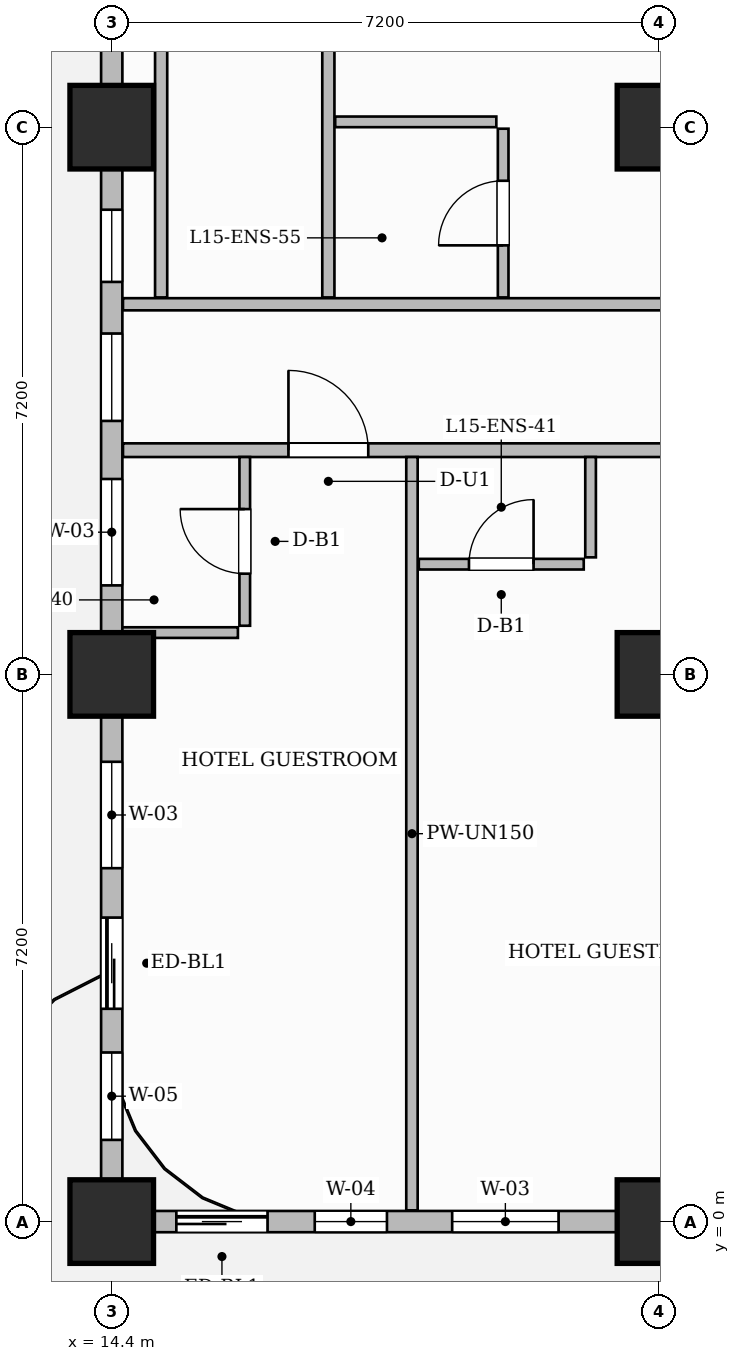
"""IFC4 building model, lengths in metres.
Left out: names, types, materials, properties, quantities, classifications, styles, units other than length and angle.
Written with IfcOpenShell. Run it as: python <this file> out.ifc"""

import sys

from ifc_helpers import new_model, si_unit, direction, frame, frame_2d, origin, origin_2d, place, context, subcontext, project, spatial, rectangle, extrude, source, transform, mapped, element, fill, save


model = new_model("IFC4")
c1 = context("Model", 3, precision=1e-05, world=origin(), true_north=direction((0.0, 1.0)))
c2 = subcontext(c1, "Body", "Model", "MODEL_VIEW")
j1 = project(units=[si_unit("LENGTHUNIT", "METRE"), si_unit("PLANEANGLEUNIT", "RADIAN")], contexts=[c1])
p1 = place(None, origin())
s1 = spatial("IfcSite", under=j1, at=p1, CompositionType="ELEMENT")
p2 = place(p1, origin())
s2 = spatial("IfcBuilding", under=s1, at=p2, CompositionType="ELEMENT")
p3 = place(p2, frame((0.0, 0.0, 65.7)))
s3 = spatial("IfcBuildingStorey", under=s2, at=p3, CompositionType="ELEMENT", Elevation=65.7)
m1 = source(origin(), c2, "Body", "SweptSolid", [
    extrude(rectangle(XDim=1.1, YDim=1.1, at=origin_2d()), origin(), (0.0, 0.0, 1.0), 3.7),
])
for number, where, z_axis, x_axis in (
    (1, (14.4, 0.0, 0.0), (0.0, 0.0, 1.0), (1.0, 0.0, 0.0)),
    (2, (14.4, 7.2, 0.0), (0.0, 0.0, 1.0), (1.0, 0.0, 0.0)),
    (3, (14.4, 14.4, 0.0), (0.0, 0.0, 1.0), (1.0, 0.0, 0.0)),
    (4, (21.6, 0.0, 0.0), (0.0, 0.0, 1.0), (1.0, 0.0, 0.0)),
    (5, (21.6, 7.2, 0.0), (0.0, 0.0, 1.0), (1.0, 0.0, 0.0)),
    (6, (21.6, 14.4, 0.0), (0.0, 0.0, 1.0), (1.0, 0.0, 0.0)),
):
    element("IfcColumn", number, at=place(p3, frame(where, z_axis=z_axis, x_axis=x_axis)), inside=s3, PredefinedType="COLUMN", context=c2, shape_type="MappedRepresentation", body=[
        mapped(m1, transform((0.0, 0.0, 0.0), scale=1.0)),
    ])
p4 = place(p3, frame((14.548, 10.15, 0.0), z_axis=(0.0, 0.0, 1.0), x_axis=(1.0, 0.0, 0.0)))
e7 = element("IfcWall", 7, at=p4, inside=s3, PredefinedType="PARTITIONING", context=c2, shape_type="SweptSolid", body=[
    extrude(rectangle(XDim=15.562, YDim=0.18, at=frame_2d((7.781, 0.0))), origin(), (0.0, 0.0, 1.0), 3.45),
])
p5 = place(p4, frame((2.177, 0.0, 0.0)))
e8 = element("IfcOpeningElement", 8, at=p5, cuts=e7, PredefinedType="OPENING", context=c2, shape_type="SweptSolid", body=[
    extrude(rectangle(XDim=1.05, YDim=2.25, at=frame_2d((0.525, 1.125))), frame((0.0, 0.1, 0.0), z_axis=(0.0, -1.0, 0.0), x_axis=(1.0, 0.0, 0.0)), (0.0, 0.0, 1.0), 0.2),
])
p6 = place(p4, frame((7.162, 0.0, 0.0)))
e9 = element("IfcOpeningElement", 9, at=p6, cuts=e7, PredefinedType="OPENING", context=c2, shape_type="SweptSolid", body=[
    extrude(rectangle(XDim=1.0, YDim=2.2, at=frame_2d((0.5, 1.1))), frame((0.0, 0.1, 0.0), z_axis=(0.0, -1.0, 0.0), x_axis=(1.0, 0.0, 0.0)), (0.0, 0.0, 1.0), 0.2),
])
p7 = place(p4, frame((11.007, 0.0, 0.0)))
e10 = element("IfcOpeningElement", 10, at=p7, cuts=e7, PredefinedType="OPENING", context=c2, shape_type="SweptSolid", body=[
    extrude(rectangle(XDim=1.05, YDim=2.25, at=frame_2d((0.525, 1.125))), frame((0.0, 0.1, 0.0), z_axis=(0.0, -1.0, 0.0), x_axis=(1.0, 0.0, 0.0)), (0.0, 0.0, 1.0), 0.2),
])
p8 = place(p4, frame((14.422, 0.0, 0.0)))
e11 = element("IfcOpeningElement", 11, at=p8, cuts=e7, PredefinedType="OPENING", context=c2, shape_type="SweptSolid", body=[
    extrude(rectangle(XDim=1.0, YDim=2.2, at=frame_2d((0.5, 1.1))), frame((0.0, 0.1, 0.0), z_axis=(0.0, -1.0, 0.0), x_axis=(1.0, 0.0, 0.0)), (0.0, 0.0, 1.0), 0.2),
])
p9 = place(p3, frame((14.548, 12.07, 0.0), z_axis=(0.0, 0.0, 1.0), x_axis=(1.0, 0.0, 0.0)))
e12 = element("IfcWall", 12, at=p9, inside=s3, PredefinedType="PARTITIONING", context=c2, shape_type="SweptSolid", body=[
    extrude(rectangle(XDim=15.562, YDim=0.16, at=frame_2d((7.781, 0.0))), origin(), (0.0, 0.0, 1.0), 3.45),
])
p10 = place(p9, frame((9.827, 0.0, 0.0)))
e13 = element("IfcOpeningElement", 13, at=p10, cuts=e12, PredefinedType="OPENING", context=c2, shape_type="SweptSolid", body=[
    extrude(rectangle(XDim=1.0, YDim=2.2, at=frame_2d((0.5, 1.1))), frame((0.0, 0.09, 0.0), z_axis=(0.0, -1.0, 0.0), x_axis=(1.0, 0.0, 0.0)), (0.0, 0.0, 1.0), 0.18),
])
p11 = place(p3, frame((16.15, 7.84, 0.0), z_axis=(0.0, 0.0, 1.0), x_axis=(0.0, 1.0, 0.0)))
e14 = element("IfcWall", 14, at=p11, inside=s3, PredefinedType="PARTITIONING", context=c2, shape_type="SweptSolid", body=[
    extrude(rectangle(XDim=2.22, YDim=0.14, at=frame_2d((1.11, 0.0))), origin(), (0.0, 0.0, 1.0), 3.45),
])
p12 = place(p11, frame((0.685, 0.0, 0.0)))
e15 = element("IfcOpeningElement", 15, at=p12, cuts=e14, PredefinedType="OPENING", context=c2, shape_type="SweptSolid", body=[
    extrude(rectangle(XDim=0.85, YDim=2.1, at=frame_2d((0.425, 1.05))), frame((0.0, 0.08, 0.0), z_axis=(0.0, -1.0, 0.0), x_axis=(1.0, 0.0, 0.0)), (0.0, 0.0, 1.0), 0.16),
])
p13 = place(p3, frame((14.49, 7.75, 0.0), z_axis=(0.0, 0.0, 1.0), x_axis=(1.0, 0.0, 0.0)))
e16 = element("IfcWall", 16, at=p13, inside=s3, PredefinedType="PARTITIONING", context=c2, shape_type="SweptSolid", body=[
    extrude(rectangle(XDim=1.57, YDim=0.14, at=frame_2d((0.785, 0.0))), origin(), (0.0, 0.0, 1.0), 3.45),
])
p14 = place(p3, frame((18.35, 0.148, 0.0), z_axis=(0.0, 0.0, 1.0), x_axis=(0.0, 1.0, 0.0)))
e17 = element("IfcWall", 17, at=p14, inside=s3, PredefinedType="PARTITIONING", context=c2, shape_type="SweptSolid", body=[
    extrude(rectangle(XDim=9.912, YDim=0.15, at=frame_2d((4.956, 0.0))), origin(), (0.0, 0.0, 1.0), 3.45),
])
p15 = place(p3, frame((20.7, 8.74, 0.0), z_axis=(0.0, 0.0, 1.0), x_axis=(0.0, 1.0, 0.0)))
e18 = element("IfcWall", 18, at=p15, inside=s3, PredefinedType="PARTITIONING", context=c2, shape_type="SweptSolid", body=[
    extrude(rectangle(XDim=1.32, YDim=0.14, at=frame_2d((0.66, 0.0))), origin(), (0.0, 0.0, 1.0), 3.45),
])
p16 = place(p3, frame((18.44, 8.65, 0.0), z_axis=(0.0, 0.0, 1.0), x_axis=(1.0, 0.0, 0.0)))
e19 = element("IfcWall", 19, at=p16, inside=s3, PredefinedType="PARTITIONING", context=c2, shape_type="SweptSolid", body=[
    extrude(rectangle(XDim=2.17, YDim=0.14, at=frame_2d((1.085, 0.0))), origin(), (0.0, 0.0, 1.0), 3.45),
])
p17 = place(p16, frame((0.66, 0.0, 0.0)))
e20 = element("IfcOpeningElement", 20, at=p17, cuts=e19, PredefinedType="OPENING", context=c2, shape_type="SweptSolid", body=[
    extrude(rectangle(XDim=0.85, YDim=2.1, at=frame_2d((0.425, 1.05))), frame((0.0, 0.08, 0.0), z_axis=(0.0, -1.0, 0.0), x_axis=(1.0, 0.0, 0.0)), (0.0, 0.0, 1.0), 0.16),
])
for number, where, z_axis, x_axis in (
    (21, (15.05, 12.16, 0.0), (0.0, 0.0, 1.0), (0.0, 1.0, 0.0)),
    (22, (17.25, 12.16, 0.0), (0.0, 0.0, 1.0), (0.0, 1.0, 0.0)),
):
    element("IfcWall", number, at=place(p3, frame(where, z_axis=z_axis, x_axis=x_axis)), inside=s3, PredefinedType="PARTITIONING", context=c2, shape_type="SweptSolid", body=[
        extrude(rectangle(XDim=12.95, YDim=0.16, at=frame_2d((6.475, 0.0))), origin(), (0.0, 0.0, 1.0), 3.45),
    ])
p18 = place(p3, frame((19.55, 12.16, 0.0), z_axis=(0.0, 0.0, 1.0), x_axis=(0.0, 1.0, 0.0)))
e23 = element("IfcWall", 23, at=p18, inside=s3, PredefinedType="PARTITIONING", context=c2, shape_type="SweptSolid", body=[
    extrude(rectangle(XDim=2.22, YDim=0.14, at=frame_2d((1.11, 0.0))), origin(), (0.0, 0.0, 1.0), 3.45),
])
p19 = place(p18, frame((0.685, 0.0, 0.0)))
e24 = element("IfcOpeningElement", 24, at=p19, cuts=e23, PredefinedType="OPENING", context=c2, shape_type="SweptSolid", body=[
    extrude(rectangle(XDim=0.85, YDim=2.1, at=frame_2d((0.425, 1.05))), frame((0.0, 0.08, 0.0), z_axis=(0.0, -1.0, 0.0), x_axis=(1.0, 0.0, 0.0)), (0.0, 0.0, 1.0), 0.16),
])
p20 = place(p3, frame((17.34, 14.47, 0.0), z_axis=(0.0, 0.0, 1.0), x_axis=(1.0, 0.0, 0.0)))
e25 = element("IfcWall", 25, at=p20, inside=s3, PredefinedType="PARTITIONING", context=c2, shape_type="SweptSolid", body=[
    extrude(rectangle(XDim=2.12, YDim=0.14, at=frame_2d((1.06, 0.0))), origin(), (0.0, 0.0, 1.0), 2.885),
])
p21 = place(p3, frame((14.4, 0.0, 0.0), z_axis=(0.0, 0.0, 1.0), x_axis=(1.0, 0.0, 0.0)))
e26 = element("IfcWall", 26, at=p21, inside=s3, PredefinedType="SOLIDWALL", context=c2, shape_type="SweptSolid", body=[
    extrude(rectangle(XDim=43.2, YDim=0.28, at=frame_2d((21.6, 0.0))), origin(), (0.0, 0.0, 1.0), 2.885),
])
p22 = place(p21, frame((0.85, 0.0, 0.0)))
e27 = element("IfcOpeningElement", 27, at=p22, cuts=e26, PredefinedType="OPENING", context=c2, shape_type="SweptSolid", body=[
    extrude(rectangle(XDim=1.2, YDim=2.2, at=frame_2d((0.6, 1.1))), frame((0.0, 0.15, 0.0), z_axis=(0.0, -1.0, 0.0), x_axis=(1.0, 0.0, 0.0)), (0.0, 0.0, 1.0), 0.3),
])
p23 = place(p21, frame((2.671, 0.0, 0.8)))
e28 = element("IfcOpeningElement", 28, at=p23, cuts=e26, PredefinedType="OPENING", context=c2, shape_type="SweptSolid", body=[
    extrude(rectangle(XDim=0.95, YDim=1.75, at=frame_2d((0.475, 0.875))), frame((0.0, 0.15, 0.0), z_axis=(0.0, -1.0, 0.0), x_axis=(1.0, 0.0, 0.0)), (0.0, 0.0, 1.0), 0.3),
])
p24 = place(p21, frame((4.479, 0.0, 0.8)))
e29 = element("IfcOpeningElement", 29, at=p24, cuts=e26, PredefinedType="OPENING", context=c2, shape_type="SweptSolid", body=[
    extrude(rectangle(XDim=1.4, YDim=1.85, at=frame_2d((0.7, 0.925))), frame((0.0, 0.15, 0.0), z_axis=(0.0, -1.0, 0.0), x_axis=(1.0, 0.0, 0.0)), (0.0, 0.0, 1.0), 0.3),
])
p25 = place(p21, frame((8.181, 0.0, 0.8)))
e30 = element("IfcOpeningElement", 30, at=p25, cuts=e26, PredefinedType="OPENING", context=c2, shape_type="SweptSolid", body=[
    extrude(rectangle(XDim=0.95, YDim=1.75, at=frame_2d((0.475, 0.875))), frame((0.0, 0.15, 0.0), z_axis=(0.0, -1.0, 0.0), x_axis=(1.0, 0.0, 0.0)), (0.0, 0.0, 1.0), 0.3),
])
p26 = place(p21, frame((9.845, 0.0, 0.8)))
e31 = element("IfcOpeningElement", 31, at=p26, cuts=e26, PredefinedType="OPENING", context=c2, shape_type="SweptSolid", body=[
    extrude(rectangle(XDim=1.8, YDim=1.85, at=frame_2d((0.9, 0.925))), frame((0.0, 0.15, 0.0), z_axis=(0.0, -1.0, 0.0), x_axis=(1.0, 0.0, 0.0)), (0.0, 0.0, 1.0), 0.3),
])
p27 = place(p21, frame((12.414, 0.0, 0.8)))
e32 = element("IfcOpeningElement", 32, at=p27, cuts=e26, PredefinedType="OPENING", context=c2, shape_type="SweptSolid", body=[
    extrude(rectangle(XDim=0.95, YDim=1.75, at=frame_2d((0.475, 0.875))), frame((0.0, 0.15, 0.0), z_axis=(0.0, -1.0, 0.0), x_axis=(1.0, 0.0, 0.0)), (0.0, 0.0, 1.0), 0.3),
])
p28 = place(p21, frame((16.804, 0.0, 0.8)))
e33 = element("IfcOpeningElement", 33, at=p28, cuts=e26, PredefinedType="OPENING", context=c2, shape_type="SweptSolid", body=[
    extrude(rectangle(XDim=1.8, YDim=1.85, at=frame_2d((0.9, 0.925))), frame((0.0, 0.15, 0.0), z_axis=(0.0, -1.0, 0.0), x_axis=(1.0, 0.0, 0.0)), (0.0, 0.0, 1.0), 0.3),
])
p29 = place(p21, frame((22.396, 0.0, 0.8)))
e34 = element("IfcOpeningElement", 34, at=p29, cuts=e26, PredefinedType="OPENING", context=c2, shape_type="SweptSolid", body=[
    extrude(rectangle(XDim=1.8, YDim=1.85, at=frame_2d((0.9, 0.925))), frame((0.0, 0.15, 0.0), z_axis=(0.0, -1.0, 0.0), x_axis=(1.0, 0.0, 0.0)), (0.0, 0.0, 1.0), 0.3),
])
p30 = place(p21, frame((25.629, 0.0, 0.8)))
e35 = element("IfcOpeningElement", 35, at=p30, cuts=e26, PredefinedType="OPENING", context=c2, shape_type="SweptSolid", body=[
    extrude(rectangle(XDim=0.95, YDim=1.75, at=frame_2d((0.475, 0.875))), frame((0.0, 0.15, 0.0), z_axis=(0.0, -1.0, 0.0), x_axis=(1.0, 0.0, 0.0)), (0.0, 0.0, 1.0), 0.3),
])
p31 = place(p21, frame((29.075, 0.0, 0.8)))
e36 = element("IfcOpeningElement", 36, at=p31, cuts=e26, PredefinedType="OPENING", context=c2, shape_type="SweptSolid", body=[
    extrude(rectangle(XDim=1.8, YDim=1.85, at=frame_2d((0.9, 0.925))), frame((0.0, 0.15, 0.0), z_axis=(0.0, -1.0, 0.0), x_axis=(1.0, 0.0, 0.0)), (0.0, 0.0, 1.0), 0.3),
])
p32 = place(p21, frame((32.125, 0.0, 0.8)))
e37 = element("IfcOpeningElement", 37, at=p32, cuts=e26, PredefinedType="OPENING", context=c2, shape_type="SweptSolid", body=[
    extrude(rectangle(XDim=1.8, YDim=1.85, at=frame_2d((0.9, 0.925))), frame((0.0, 0.15, 0.0), z_axis=(0.0, -1.0, 0.0), x_axis=(1.0, 0.0, 0.0)), (0.0, 0.0, 1.0), 0.3),
])
p33 = place(p21, frame((36.946, 0.0, 0.8)))
e38 = element("IfcOpeningElement", 38, at=p33, cuts=e26, PredefinedType="OPENING", context=c2, shape_type="SweptSolid", body=[
    extrude(rectangle(XDim=1.8, YDim=1.85, at=frame_2d((0.9, 0.925))), frame((0.0, 0.15, 0.0), z_axis=(0.0, -1.0, 0.0), x_axis=(1.0, 0.0, 0.0)), (0.0, 0.0, 1.0), 0.3),
])
p34 = place(p21, frame((40.054, 0.0, 0.8)))
e39 = element("IfcOpeningElement", 39, at=p34, cuts=e26, PredefinedType="OPENING", context=c2, shape_type="SweptSolid", body=[
    extrude(rectangle(XDim=1.8, YDim=1.85, at=frame_2d((0.9, 0.925))), frame((0.0, 0.15, 0.0), z_axis=(0.0, -1.0, 0.0), x_axis=(1.0, 0.0, 0.0)), (0.0, 0.0, 1.0), 0.3),
])
p35 = place(p3, frame((14.4, 0.05, 0.0), z_axis=(0.0, 0.0, 1.0), x_axis=(0.0, 1.0, 0.0)))
e40 = element("IfcWall", 40, at=p35, inside=s3, PredefinedType="SOLIDWALL", context=c2, shape_type="SweptSolid", body=[
    extrude(rectangle(XDim=20.6, YDim=0.28, at=frame_2d((10.3, 0.0))), origin(), (0.0, 0.0, 1.0), 2.885),
])
p36 = place(p35, frame((2.75, 0.0, 0.0)))
e41 = element("IfcOpeningElement", 41, at=p36, cuts=e40, PredefinedType="OPENING", context=c2, shape_type="SweptSolid", body=[
    extrude(rectangle(XDim=1.2, YDim=2.2, at=frame_2d((0.6, 1.1))), frame((0.0, 0.15, 0.0), z_axis=(0.0, -1.0, 0.0), x_axis=(1.0, 0.0, 0.0)), (0.0, 0.0, 1.0), 0.3),
])
p37 = place(p35, frame((1.025, 0.0, 0.8)))
e42 = element("IfcOpeningElement", 42, at=p37, cuts=e40, PredefinedType="OPENING", context=c2, shape_type="SweptSolid", body=[
    extrude(rectangle(XDim=1.15, YDim=1.8, at=frame_2d((0.575, 0.9))), frame((0.0, 0.15, 0.0), z_axis=(0.0, -1.0, 0.0), x_axis=(1.0, 0.0, 0.0)), (0.0, 0.0, 1.0), 0.3),
])
p38 = place(p35, frame((4.6, 0.0, 0.8)))
e43 = element("IfcOpeningElement", 43, at=p38, cuts=e40, PredefinedType="OPENING", context=c2, shape_type="SweptSolid", body=[
    extrude(rectangle(XDim=1.4, YDim=1.85, at=frame_2d((0.7, 0.925))), frame((0.0, 0.15, 0.0), z_axis=(0.0, -1.0, 0.0), x_axis=(1.0, 0.0, 0.0)), (0.0, 0.0, 1.0), 0.3),
])
p39 = place(p35, frame((8.321, 0.0, 0.8)))
e44 = element("IfcOpeningElement", 44, at=p39, cuts=e40, PredefinedType="OPENING", context=c2, shape_type="SweptSolid", body=[
    extrude(rectangle(XDim=1.4, YDim=1.85, at=frame_2d((0.7, 0.925))), frame((0.0, 0.15, 0.0), z_axis=(0.0, -1.0, 0.0), x_axis=(1.0, 0.0, 0.0)), (0.0, 0.0, 1.0), 0.3),
])
p40 = place(p35, frame((10.485, 0.0, 0.8)))
e45 = element("IfcOpeningElement", 45, at=p40, cuts=e40, PredefinedType="OPENING", context=c2, shape_type="SweptSolid", body=[
    extrude(rectangle(XDim=1.15, YDim=1.8, at=frame_2d((0.575, 0.9))), frame((0.0, 0.15, 0.0), z_axis=(0.0, -1.0, 0.0), x_axis=(1.0, 0.0, 0.0)), (0.0, 0.0, 1.0), 0.3),
])
p41 = place(p35, frame((12.314, 0.0, 0.8)))
e46 = element("IfcOpeningElement", 46, at=p41, cuts=e40, PredefinedType="OPENING", context=c2, shape_type="SweptSolid", body=[
    extrude(rectangle(XDim=0.95, YDim=1.75, at=frame_2d((0.475, 0.875))), frame((0.0, 0.15, 0.0), z_axis=(0.0, -1.0, 0.0), x_axis=(1.0, 0.0, 0.0)), (0.0, 0.0, 1.0), 0.3),
])
p42 = place(p35, frame((16.79, 0.0, 0.8)))
e47 = element("IfcOpeningElement", 47, at=p42, cuts=e40, PredefinedType="OPENING", context=c2, shape_type="SweptSolid", body=[
    extrude(rectangle(XDim=1.8, YDim=1.85, at=frame_2d((0.9, 0.925))), frame((0.0, 0.15, 0.0), z_axis=(0.0, -1.0, 0.0), x_axis=(1.0, 0.0, 0.0)), (0.0, 0.0, 1.0), 0.3),
])
m2 = source(origin(), c2, "Body", "SweptSolid", [
    extrude(rectangle(XDim=0.85, YDim=2.1, at=frame_2d((0.425, 1.05))), frame((0.0, 0.025, 0.0), z_axis=(0.0, -1.0, 0.0), x_axis=(1.0, 0.0, 0.0)), (0.0, 0.0, 1.0), 0.05),
])
p43 = place(p12, origin())
e48 = element("IfcDoor", 48, at=p43, inside=s3, OperationType="SINGLE_SWING_RIGHT", PredefinedType="DOOR", context=c2, shape_type="MappedRepresentation", body=[
    mapped(m2, transform((0.0, 0.0, 0.0), scale=1.0)),
])
fill(e15, e48)
m3 = source(origin(), c2, "Body", "SweptSolid", [
    extrude(rectangle(XDim=1.05, YDim=2.25, at=frame_2d((0.525, 1.125))), frame((0.0, 0.025, 0.0), z_axis=(0.0, -1.0, 0.0), x_axis=(1.0, 0.0, 0.0)), (0.0, 0.0, 1.0), 0.05),
])
p44 = place(p5, origin())
e49 = element("IfcDoor", 49, at=p44, inside=s3, OperationType="SINGLE_SWING_LEFT", PredefinedType="DOOR", context=c2, shape_type="MappedRepresentation", body=[
    mapped(m3, transform((0.0, 0.0, 0.0), scale=1.0)),
])
fill(e8, e49)
p45 = place(p17, origin())
e50 = element("IfcDoor", 50, at=p45, inside=s3, OperationType="SINGLE_SWING_RIGHT", PredefinedType="DOOR", context=c2, shape_type="MappedRepresentation", body=[
    mapped(m2, transform((0.0, 0.0, 0.0), scale=1.0)),
])
fill(e20, e50)
p46 = place(p19, origin())
e51 = element("IfcDoor", 51, at=p46, inside=s3, OperationType="SINGLE_SWING_LEFT", PredefinedType="DOOR", context=c2, shape_type="MappedRepresentation", body=[
    mapped(m2, transform((0.0, 0.0, 0.0), scale=1.0)),
])
fill(e24, e51)
m4 = source(origin(), c2, "Body", "SweptSolid", [
    extrude(rectangle(XDim=1.2, YDim=2.2, at=frame_2d((0.6, 1.1))), frame((0.0, 0.025, 0.0), z_axis=(0.0, -1.0, 0.0), x_axis=(1.0, 0.0, 0.0)), (0.0, 0.0, 1.0), 0.05),
])
p47 = place(p22, origin())
e52 = element("IfcDoor", 52, at=p47, inside=s3, OperationType="SLIDING_TO_LEFT", PredefinedType="DOOR", context=c2, shape_type="MappedRepresentation", body=[
    mapped(m4, transform((0.0, 0.0, 0.0), scale=1.0)),
])
fill(e27, e52)
p48 = place(p36, origin())
e53 = element("IfcDoor", 53, at=p48, inside=s3, OperationType="SLIDING_TO_LEFT", PredefinedType="DOOR", context=c2, shape_type="MappedRepresentation", body=[
    mapped(m4, transform((0.0, 0.0, 0.0), scale=1.0)),
])
fill(e41, e53)
m5 = source(origin(), c2, "Body", "SweptSolid", [
    extrude(rectangle(XDim=0.95, YDim=1.75, at=frame_2d((0.475, 0.875))), frame((0.0, 0.03, 0.0), z_axis=(0.0, -1.0, 0.0), x_axis=(1.0, 0.0, 0.0)), (0.0, 0.0, 1.0), 0.06),
])
p49 = place(p23, origin())
e54 = element("IfcWindow", 54, at=p49, inside=s3, PartitioningType="SINGLE_PANEL", PredefinedType="WINDOW", context=c2, shape_type="MappedRepresentation", body=[
    mapped(m5, transform((0.0, 0.0, 0.0), scale=1.0)),
])
fill(e28, e54)
m6 = source(origin(), c2, "Body", "SweptSolid", [
    extrude(rectangle(XDim=1.4, YDim=1.85, at=frame_2d((0.7, 0.925))), frame((0.0, 0.03, 0.0), z_axis=(0.0, -1.0, 0.0), x_axis=(1.0, 0.0, 0.0)), (0.0, 0.0, 1.0), 0.06),
])
p50 = place(p24, origin())
e55 = element("IfcWindow", 55, at=p50, inside=s3, PartitioningType="SINGLE_PANEL", PredefinedType="WINDOW", context=c2, shape_type="MappedRepresentation", body=[
    mapped(m6, transform((0.0, 0.0, 0.0), scale=1.0)),
])
fill(e29, e55)
m7 = source(origin(), c2, "Body", "SweptSolid", [
    extrude(rectangle(XDim=1.15, YDim=1.8, at=frame_2d((0.575, 0.9))), frame((0.0, 0.03, 0.0), z_axis=(0.0, -1.0, 0.0), x_axis=(1.0, 0.0, 0.0)), (0.0, 0.0, 1.0), 0.06),
])
p51 = place(p37, origin())
e56 = element("IfcWindow", 56, at=p51, inside=s3, PartitioningType="SINGLE_PANEL", PredefinedType="WINDOW", context=c2, shape_type="MappedRepresentation", body=[
    mapped(m7, transform((0.0, 0.0, 0.0), scale=1.0)),
])
fill(e42, e56)
p52 = place(p38, origin())
e57 = element("IfcWindow", 57, at=p52, inside=s3, PartitioningType="SINGLE_PANEL", PredefinedType="WINDOW", context=c2, shape_type="MappedRepresentation", body=[
    mapped(m6, transform((0.0, 0.0, 0.0), scale=1.0)),
])
fill(e43, e57)
p53 = place(p39, origin())
e58 = element("IfcWindow", 58, at=p53, inside=s3, PartitioningType="SINGLE_PANEL", PredefinedType="WINDOW", context=c2, shape_type="MappedRepresentation", body=[
    mapped(m6, transform((0.0, 0.0, 0.0), scale=1.0)),
])
fill(e44, e58)
p54 = place(p40, origin())
e59 = element("IfcWindow", 59, at=p54, inside=s3, PartitioningType="SINGLE_PANEL", PredefinedType="WINDOW", context=c2, shape_type="MappedRepresentation", body=[
    mapped(m7, transform((0.0, 0.0, 0.0), scale=1.0)),
])
fill(e45, e59)
p55 = place(p41, origin())
e60 = element("IfcWindow", 60, at=p55, inside=s3, PartitioningType="SINGLE_PANEL", PredefinedType="WINDOW", context=c2, shape_type="MappedRepresentation", body=[
    mapped(m5, transform((0.0, 0.0, 0.0), scale=1.0)),
])
fill(e46, e60)
save(model, sys.argv[1])
